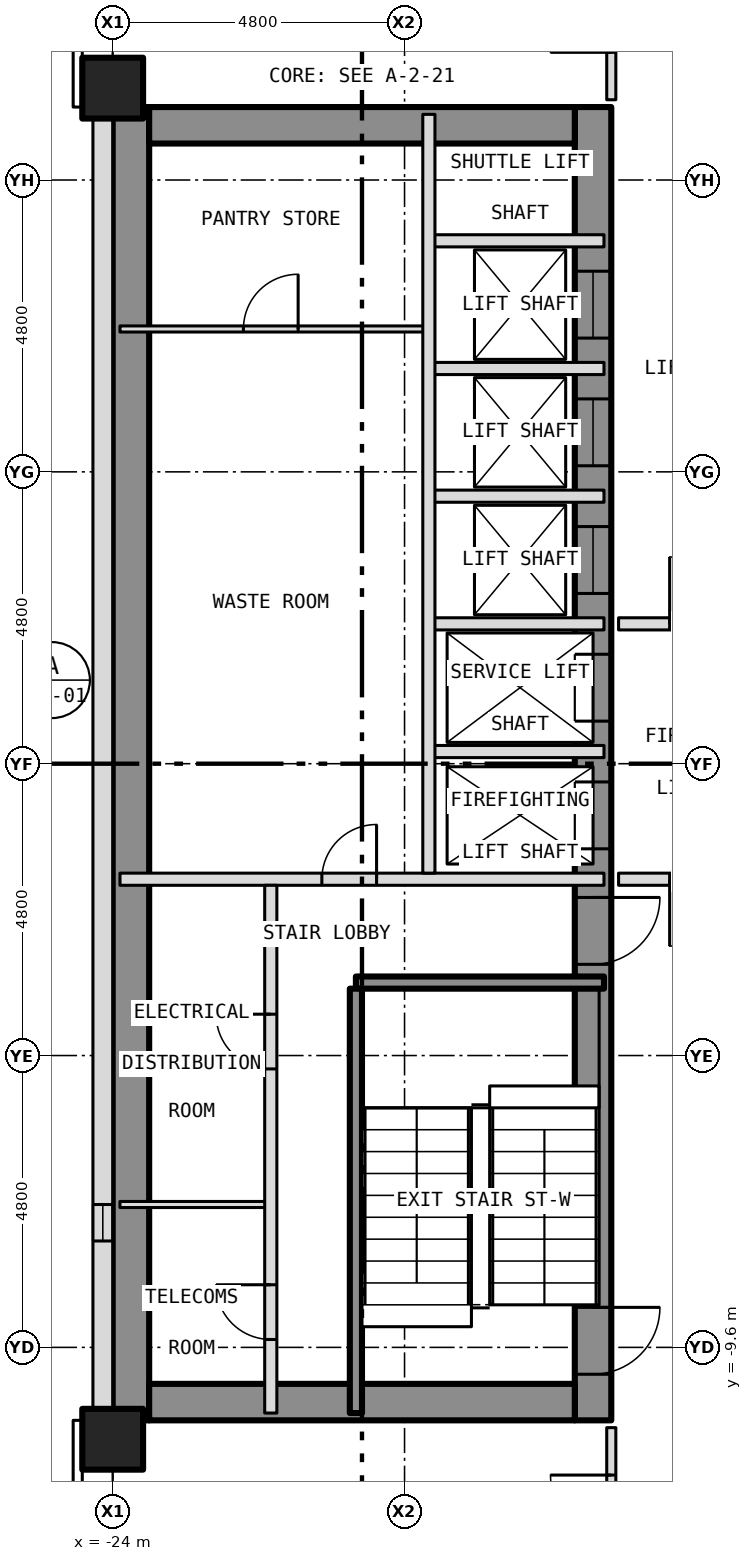
"""IFC4 building model, lengths in metres.
Left out: names, types, materials, properties, quantities, classifications, styles, units other than length and angle.
Written with IfcOpenShell. Run it as: python <this file> out.ifc"""

import sys

from ifc_helpers import new_model, si_unit, direction, frame, frame_2d, origin, origin_2d, place, context, subcontext, project, spatial, rectangle, hollow_rectangle, extrude, element, fill, save


model = new_model("IFC4")
c1 = context("Model", 3, precision=1e-05, world=origin(), true_north=direction((0.0, 1.0)))
c2 = subcontext(c1, "Body", "Model", "MODEL_VIEW")
j1 = project(units=[si_unit("LENGTHUNIT", "METRE"), si_unit("PLANEANGLEUNIT", "RADIAN")], contexts=[c1])
p1 = place(None, origin())
s1 = spatial("IfcSite", under=j1, at=p1, CompositionType="ELEMENT")
p2 = place(p1, origin())
s2 = spatial("IfcBuilding", under=s1, at=p2, CompositionType="ELEMENT")
p3 = place(p2, frame((0.0, 0.0, 77.5)))
s3 = spatial("IfcBuildingStorey", under=s2, at=p3, CompositionType="ELEMENT", Elevation=77.5)
for number, where, z_axis, x_axis in (
    (1, (-24.0, -11.111, -0.15), (0.0, 0.0, 1.0), (1.0, 0.0, 0.0)),
    (2, (-24.0, 11.111, -0.15), (0.0, 0.0, 1.0), (1.0, 0.0, 0.0)),
):
    element("IfcColumn", number, at=place(p3, frame(where, z_axis=z_axis, x_axis=x_axis)), inside=s3, PredefinedType="COLUMN", context=c2, shape_type="SweptSolid", body=[
        extrude(hollow_rectangle(XDim=1.0, YDim=1.0, WallThickness=0.06, at=origin_2d()), origin(), (0.0, 0.0, 1.0), 3.5),
    ])
p4 = place(p3, frame((-16.1, -10.8, 0.0), z_axis=(0.0, 0.0, 1.0), x_axis=(0.0, 1.0, 0.0)))
e3 = element("IfcWall", 3, at=p4, inside=s3, PredefinedType="SHEAR", context=c2, shape_type="SweptSolid", body=[
    extrude(rectangle(XDim=21.6, YDim=0.6, at=frame_2d((10.8, 0.0))), origin(), (0.0, 0.0, 1.0), 3.25),
])
p5 = place(p4, frame((9.4, 0.0, 0.0)))
e4 = element("IfcOpeningElement", 4, at=p5, cuts=e3, PredefinedType="OPENING", context=c2, shape_type="SweptSolid", body=[
    extrude(rectangle(XDim=1.1, YDim=2.1, at=frame_2d((0.55, 1.05))), frame((0.0, 0.312, 0.0), z_axis=(0.0, -1.0, 0.0), x_axis=(1.0, 0.0, 0.0)), (0.0, 0.0, 1.0), 0.624),
])
p6 = place(p4, frame((11.5, 0.0, 0.0)))
e5 = element("IfcOpeningElement", 5, at=p6, cuts=e3, PredefinedType="OPENING", context=c2, shape_type="SweptSolid", body=[
    extrude(rectangle(XDim=1.1, YDim=2.1, at=frame_2d((0.55, 1.05))), frame((0.0, 0.312, 0.0), z_axis=(0.0, -1.0, 0.0), x_axis=(1.0, 0.0, 0.0)), (0.0, 0.0, 1.0), 0.624),
])
p7 = place(p4, frame((13.6, 0.0, 0.0)))
e6 = element("IfcOpeningElement", 6, at=p7, cuts=e3, PredefinedType="OPENING", context=c2, shape_type="SweptSolid", body=[
    extrude(rectangle(XDim=1.1, YDim=2.1, at=frame_2d((0.55, 1.05))), frame((0.0, 0.312, 0.0), z_axis=(0.0, -1.0, 0.0), x_axis=(1.0, 0.0, 0.0)), (0.0, 0.0, 1.0), 0.624),
])
p8 = place(p4, frame((15.7, 0.0, 0.0)))
e7 = element("IfcOpeningElement", 7, at=p8, cuts=e3, PredefinedType="OPENING", context=c2, shape_type="SweptSolid", body=[
    extrude(rectangle(XDim=1.1, YDim=2.1, at=frame_2d((0.55, 1.05))), frame((0.0, 0.312, 0.0), z_axis=(0.0, -1.0, 0.0), x_axis=(1.0, 0.0, 0.0)), (0.0, 0.0, 1.0), 0.624),
])
p9 = place(p4, frame((17.8, 0.0, 0.0)))
e8 = element("IfcOpeningElement", 8, at=p9, cuts=e3, PredefinedType="OPENING", context=c2, shape_type="SweptSolid", body=[
    extrude(rectangle(XDim=1.1, YDim=2.1, at=frame_2d((0.55, 1.05))), frame((0.0, 0.312, 0.0), z_axis=(0.0, -1.0, 0.0), x_axis=(1.0, 0.0, 0.0)), (0.0, 0.0, 1.0), 0.624),
])
p10 = place(p4, frame((0.758, 0.0, 0.0)))
e9 = element("IfcOpeningElement", 9, at=p10, cuts=e3, PredefinedType="OPENING", context=c2, shape_type="SweptSolid", body=[
    extrude(rectangle(XDim=1.1, YDim=2.1, at=frame_2d((0.55, 1.05))), frame((0.0, 0.312, 0.0), z_axis=(0.0, -1.0, 0.0), x_axis=(1.0, 0.0, 0.0)), (0.0, 0.0, 1.0), 0.624),
])
p11 = place(p4, frame((7.5, 0.0, 0.0)))
e10 = element("IfcOpeningElement", 10, at=p11, cuts=e3, PredefinedType="OPENING", context=c2, shape_type="SweptSolid", body=[
    extrude(rectangle(XDim=1.1, YDim=2.1, at=frame_2d((0.55, 1.05))), frame((0.0, 0.312, 0.0), z_axis=(0.0, -1.0, 0.0), x_axis=(1.0, 0.0, 0.0)), (0.0, 0.0, 1.0), 0.624),
])
p12 = place(p3, frame((-23.7, -10.8, 0.0), z_axis=(0.0, 0.0, 1.0), x_axis=(0.0, 1.0, 0.0)))
e11 = element("IfcWall", 11, at=p12, inside=s3, PredefinedType="SHEAR", context=c2, shape_type="SweptSolid", body=[
    extrude(rectangle(XDim=21.6, YDim=0.6, at=frame_2d((10.8, 0.0))), origin(), (0.0, 0.0, 1.0), 3.25),
])
for number, where, z_axis, x_axis in (
    (12, (-23.4, 10.5, 0.0), (0.0, 0.0, 1.0), (1.0, 0.0, 0.0)),
    (13, (-23.4, -10.5, 0.0), (0.0, 0.0, 1.0), (1.0, 0.0, 0.0)),
):
    element("IfcWall", number, at=place(p3, frame(where, z_axis=z_axis, x_axis=x_axis)), inside=s3, PredefinedType="SHEAR", context=c2, shape_type="SweptSolid", body=[
        extrude(rectangle(XDim=7.0, YDim=0.6, at=frame_2d((3.5, 0.0))), origin(), (0.0, 0.0, 1.0), 3.25),
    ])
p13 = place(p3, frame((-24.163, 10.8, 0.0), z_axis=(0.0, 0.0, 1.0), x_axis=(0.0, -1.0, 0.0)))
e14 = element("IfcWall", 14, at=p13, inside=s3, PredefinedType="SOLIDWALL", context=c2, shape_type="SweptSolid", body=[
    extrude(rectangle(XDim=21.6, YDim=0.325, at=frame_2d((10.8, 0.0))), origin(), (0.0, 0.0, 1.0), 3.5),
])
p14 = place(p13, frame((18.05, 0.0, 1.0)))
e15 = element("IfcOpeningElement", 15, at=p14, cuts=e14, PredefinedType="OPENING", context=c2, shape_type="SweptSolid", body=[
    extrude(rectangle(XDim=0.6, YDim=1.5, at=frame_2d((0.3, 0.75))), frame((0.0, 0.175, 0.0), z_axis=(0.0, -1.0, 0.0), x_axis=(1.0, 0.0, 0.0)), (0.0, 0.0, 1.0), 0.349),
])
p15 = place(p3, frame((-23.88, -7.25, 0.0), z_axis=(0.0, 0.0, 1.0), x_axis=(1.0, 0.0, 0.0)))
e16 = element("IfcWall", 16, at=p15, inside=s3, PredefinedType="PARTITIONING", context=c2, shape_type="SweptSolid", body=[
    extrude(rectangle(XDim=2.48, YDim=0.1, at=frame_2d((1.24, 0.0))), origin(), (0.0, 0.0, 1.0), 3.25),
])
p16 = place(p3, frame((-20.0, -3.6, 0.0), z_axis=(0.0, 0.0, 1.0), x_axis=(1.0, 0.0, 0.0)))
e17 = element("IfcWall", 17, at=p16, inside=s3, PredefinedType="SHEAR", context=c2, shape_type="SweptSolid", body=[
    extrude(rectangle(XDim=4.08, YDim=0.2, at=frame_2d((2.04, 0.0))), origin(), (0.0, 0.0, 1.0), 3.25),
])
p17 = place(p3, frame((-23.88, -1.9, 0.0), z_axis=(0.0, 0.0, 1.0), x_axis=(1.0, 0.0, 0.0)))
e18 = element("IfcWall", 18, at=p17, inside=s3, PredefinedType="PARTITIONING", context=c2, shape_type="SweptSolid", body=[
    extrude(rectangle(XDim=7.96, YDim=0.2, at=frame_2d((3.98, 0.0))), origin(), (0.0, 0.0, 1.0), 3.25),
])
p18 = place(p17, frame((3.32, 0.0, 0.0)))
e19 = element("IfcOpeningElement", 19, at=p18, cuts=e18, PredefinedType="OPENING", context=c2, shape_type="SweptSolid", body=[
    extrude(rectangle(XDim=0.9, YDim=2.1, at=frame_2d((0.45, 1.05))), frame((0.0, 0.112, 0.0), z_axis=(0.0, -1.0, 0.0), x_axis=(1.0, 0.0, 0.0)), (0.0, 0.0, 1.0), 0.224),
])
p19 = place(p3, frame((-15.68, -1.9, 0.0), z_axis=(0.0, 0.0, 1.0), x_axis=(1.0, 0.0, 0.0)))
e20 = element("IfcWall", 20, at=p19, inside=s3, PredefinedType="PARTITIONING", context=c2, shape_type="SweptSolid", body=[
    extrude(rectangle(XDim=3.28, YDim=0.2, at=frame_2d((1.64, 0.0))), origin(), (0.0, 0.0, 1.0), 3.35),
])
p20 = place(p19, frame((0.84, 0.0, 0.0)))
e21 = element("IfcOpeningElement", 21, at=p20, cuts=e20, PredefinedType="OPENING", context=c2, shape_type="SweptSolid", body=[
    extrude(rectangle(XDim=1.1, YDim=2.1, at=frame_2d((0.55, 1.05))), frame((0.0, 0.112, 0.0), z_axis=(0.0, -1.0, 0.0), x_axis=(1.0, 0.0, 0.0)), (0.0, 0.0, 1.0), 0.224),
])
for number, where, z_axis, x_axis in (
    (22, (-18.8, 0.2, 0.0), (0.0, 0.0, 1.0), (1.0, 0.0, 0.0)),
    (23, (-18.8, 2.3, 0.0), (0.0, 0.0, 1.0), (1.0, 0.0, 0.0)),
):
    element("IfcWall", number, at=place(p3, frame(where, z_axis=z_axis, x_axis=x_axis)), inside=s3, PredefinedType="PARTITIONING", context=c2, shape_type="SweptSolid", body=[
        extrude(rectangle(XDim=2.88, YDim=0.2, at=frame_2d((1.44, 0.0))), origin(), (0.0, 0.0, 1.0), 3.25),
    ])
p21 = place(p3, frame((-15.68, 2.3, 0.0), z_axis=(0.0, 0.0, 1.0), x_axis=(1.0, 0.0, 0.0)))
e24 = element("IfcWall", 24, at=p21, inside=s3, PredefinedType="PARTITIONING", context=c2, shape_type="SweptSolid", body=[
    extrude(rectangle(XDim=3.28, YDim=0.2, at=frame_2d((1.64, 0.0))), origin(), (0.0, 0.0, 1.0), 3.35),
])
p22 = place(p21, frame((0.84, 0.0, 0.0)))
e25 = element("IfcOpeningElement", 25, at=p22, cuts=e24, PredefinedType="OPENING", context=c2, shape_type="SweptSolid", body=[
    extrude(rectangle(XDim=1.1, YDim=2.1, at=frame_2d((0.55, 1.05))), frame((0.0, 0.112, 0.0), z_axis=(0.0, -1.0, 0.0), x_axis=(1.0, 0.0, 0.0)), (0.0, 0.0, 1.0), 0.224),
])
for number, where, z_axis, x_axis in (
    (26, (-18.8, 4.4, 0.0), (0.0, 0.0, 1.0), (1.0, 0.0, 0.0)),
    (27, (-18.8, 6.5, 0.0), (0.0, 0.0, 1.0), (1.0, 0.0, 0.0)),
):
    element("IfcWall", number, at=place(p3, frame(where, z_axis=z_axis, x_axis=x_axis)), inside=s3, PredefinedType="PARTITIONING", context=c2, shape_type="SweptSolid", body=[
        extrude(rectangle(XDim=2.88, YDim=0.2, at=frame_2d((1.44, 0.0))), origin(), (0.0, 0.0, 1.0), 3.25),
    ])
p23 = place(p3, frame((-23.88, 7.15, 0.0), z_axis=(0.0, 0.0, 1.0), x_axis=(1.0, 0.0, 0.0)))
e28 = element("IfcWall", 28, at=p23, inside=s3, PredefinedType="PARTITIONING", context=c2, shape_type="SweptSolid", body=[
    extrude(rectangle(XDim=5.08, YDim=0.1, at=frame_2d((2.54, 0.0))), origin(), (0.0, 0.0, 1.0), 3.25),
])
p24 = place(p23, frame((2.03, 0.0, 0.0)))
e29 = element("IfcOpeningElement", 29, at=p24, cuts=e28, PredefinedType="OPENING", context=c2, shape_type="SweptSolid", body=[
    extrude(rectangle(XDim=0.9, YDim=2.1, at=frame_2d((0.45, 1.05))), frame((0.0, 0.062, 0.0), z_axis=(0.0, -1.0, 0.0), x_axis=(1.0, 0.0, 0.0)), (0.0, 0.0, 1.0), 0.124),
])
p25 = place(p3, frame((-18.8, 8.6, 0.0), z_axis=(0.0, 0.0, 1.0), x_axis=(1.0, 0.0, 0.0)))
e30 = element("IfcWall", 30, at=p25, inside=s3, PredefinedType="PARTITIONING", context=c2, shape_type="SweptSolid", body=[
    extrude(rectangle(XDim=2.88, YDim=0.2, at=frame_2d((1.44, 0.0))), origin(), (0.0, 0.0, 1.0), 3.25),
])
p26 = place(p3, frame((-21.4, -10.68, 0.0), z_axis=(0.0, 0.0, 1.0), x_axis=(0.0, 1.0, 0.0)))
e31 = element("IfcWall", 31, at=p26, inside=s3, PredefinedType="PARTITIONING", context=c2, shape_type="SweptSolid", body=[
    extrude(rectangle(XDim=8.68, YDim=0.2, at=frame_2d((4.34, 0.0))), origin(), (0.0, 0.0, 1.0), 3.25),
])
p27 = place(p26, frame((1.21, 0.0, 0.0)))
e32 = element("IfcOpeningElement", 32, at=p27, cuts=e31, PredefinedType="OPENING", context=c2, shape_type="SweptSolid", body=[
    extrude(rectangle(XDim=0.9, YDim=2.1, at=frame_2d((0.45, 1.05))), frame((0.0, 0.112, 0.0), z_axis=(0.0, -1.0, 0.0), x_axis=(1.0, 0.0, 0.0)), (0.0, 0.0, 1.0), 0.224),
])
p28 = place(p26, frame((5.66, 0.0, 0.0)))
e33 = element("IfcOpeningElement", 33, at=p28, cuts=e31, PredefinedType="OPENING", context=c2, shape_type="SweptSolid", body=[
    extrude(rectangle(XDim=0.9, YDim=2.1, at=frame_2d((0.45, 1.05))), frame((0.0, 0.112, 0.0), z_axis=(0.0, -1.0, 0.0), x_axis=(1.0, 0.0, 0.0)), (0.0, 0.0, 1.0), 0.224),
])
p29 = place(p3, frame((-20.0, -10.68, 0.0), z_axis=(0.0, 0.0, 1.0), x_axis=(0.0, 1.0, 0.0)))
e34 = element("IfcWall", 34, at=p29, inside=s3, PredefinedType="SHEAR", context=c2, shape_type="SweptSolid", body=[
    extrude(rectangle(XDim=6.98, YDim=0.2, at=frame_2d((3.49, 0.0))), origin(), (0.0, 0.0, 1.0), 3.25),
])
p30 = place(p3, frame((-18.8, -1.8, 0.0), z_axis=(0.0, 0.0, 1.0), x_axis=(0.0, 1.0, 0.0)))
e35 = element("IfcWall", 35, at=p30, inside=s3, PredefinedType="PARTITIONING", context=c2, shape_type="SweptSolid", body=[
    extrude(rectangle(XDim=12.48, YDim=0.2, at=frame_2d((6.24, 0.0))), origin(), (0.0, 0.0, 1.0), 3.25),
])
p31 = place(p3, frame((-15.8, -15.725, 0.0), z_axis=(0.0, 0.0, 1.0), x_axis=(0.0, 1.0, 0.0)))
e36 = element("IfcWall", 36, at=p31, inside=s3, PredefinedType="PARTITIONING", context=c2, shape_type="SweptSolid", body=[
    extrude(rectangle(XDim=4.805, YDim=0.15, at=frame_2d((2.403, 0.0))), origin(), (0.0, 0.0, 1.0), 3.35),
])
p32 = place(p31, frame((3.025, 0.0, 0.0)))
e37 = element("IfcOpeningElement", 37, at=p32, cuts=e36, PredefinedType="OPENING", context=c2, shape_type="SweptSolid", body=[
    extrude(rectangle(XDim=1.0, YDim=2.1, at=frame_2d((0.5, 1.05))), frame((0.0, 0.087, 0.0), z_axis=(0.0, -1.0, 0.0), x_axis=(1.0, 0.0, 0.0)), (0.0, 0.0, 1.0), 0.174),
])
p33 = place(p3, frame((-15.8, 10.92, 0.0), z_axis=(0.0, 0.0, 1.0), x_axis=(0.0, 1.0, 0.0)))
e38 = element("IfcWall", 38, at=p33, inside=s3, PredefinedType="PARTITIONING", context=c2, shape_type="SweptSolid", body=[
    extrude(rectangle(XDim=4.805, YDim=0.15, at=frame_2d((2.403, 0.0))), origin(), (0.0, 0.0, 1.0), 3.35),
])
p34 = place(p33, frame((0.78, 0.0, 0.0)))
e39 = element("IfcOpeningElement", 39, at=p34, cuts=e38, PredefinedType="OPENING", context=c2, shape_type="SweptSolid", body=[
    extrude(rectangle(XDim=1.0, YDim=2.1, at=frame_2d((0.5, 1.05))), frame((0.0, 0.087, 0.0), z_axis=(0.0, -1.0, 0.0), x_axis=(1.0, 0.0, 0.0)), (0.0, 0.0, 1.0), 0.174),
])
p35 = place(p14, origin())
e40 = element("IfcWindow", 40, at=p35, inside=s3, PartitioningType="SINGLE_PANEL", PredefinedType="WINDOW", context=c2, shape_type="SweptSolid", body=[
    extrude(rectangle(XDim=0.6, YDim=1.5, at=frame_2d((0.3, 0.75))), frame((0.0, -0.073, 0.0), z_axis=(0.0, -1.0, 0.0), x_axis=(1.0, 0.0, 0.0)), (0.0, 0.0, 1.0), 0.06),
])
fill(e15, e40)
p36 = place(p5, origin())
e41 = element("IfcDoor", 41, at=p36, inside=s3, OperationType="SLIDING_TO_LEFT", PredefinedType="DOOR", context=c2, shape_type="SweptSolid", body=[
    extrude(rectangle(XDim=1.1, YDim=2.1, at=frame_2d((0.55, 1.05))), frame((0.0, 0.025, 0.0), z_axis=(0.0, -1.0, 0.0), x_axis=(1.0, 0.0, 0.0)), (0.0, 0.0, 1.0), 0.05),
])
fill(e4, e41)
p37 = place(p6, origin())
e42 = element("IfcDoor", 42, at=p37, inside=s3, OperationType="SLIDING_TO_LEFT", PredefinedType="DOOR", context=c2, shape_type="SweptSolid", body=[
    extrude(rectangle(XDim=1.1, YDim=2.1, at=frame_2d((0.55, 1.05))), frame((0.0, 0.025, 0.0), z_axis=(0.0, -1.0, 0.0), x_axis=(1.0, 0.0, 0.0)), (0.0, 0.0, 1.0), 0.05),
])
fill(e5, e42)
p38 = place(p7, origin())
e43 = element("IfcDoor", 43, at=p38, inside=s3, OperationType="SLIDING_TO_LEFT", PredefinedType="DOOR", context=c2, shape_type="SweptSolid", body=[
    extrude(rectangle(XDim=1.1, YDim=2.1, at=frame_2d((0.55, 1.05))), frame((0.0, 0.025, 0.0), z_axis=(0.0, -1.0, 0.0), x_axis=(1.0, 0.0, 0.0)), (0.0, 0.0, 1.0), 0.05),
])
fill(e6, e43)
p39 = place(p8, origin())
e44 = element("IfcDoor", 44, at=p39, inside=s3, OperationType="SLIDING_TO_LEFT", PredefinedType="DOOR", context=c2, shape_type="SweptSolid", body=[
    extrude(rectangle(XDim=1.1, YDim=2.1, at=frame_2d((0.55, 1.05))), frame((0.0, 0.025, 0.0), z_axis=(0.0, -1.0, 0.0), x_axis=(1.0, 0.0, 0.0)), (0.0, 0.0, 1.0), 0.05),
])
fill(e7, e44)
p40 = place(p9, origin())
e45 = element("IfcDoor", 45, at=p40, inside=s3, OperationType="SLIDING_TO_LEFT", PredefinedType="DOOR", context=c2, shape_type="SweptSolid", body=[
    extrude(rectangle(XDim=1.1, YDim=2.1, at=frame_2d((0.55, 1.05))), frame((0.0, 0.025, 0.0), z_axis=(0.0, -1.0, 0.0), x_axis=(1.0, 0.0, 0.0)), (0.0, 0.0, 1.0), 0.05),
])
fill(e8, e45)
p41 = place(p10, origin())
e46 = element("IfcDoor", 46, at=p41, inside=s3, OperationType="SINGLE_SWING_RIGHT", PredefinedType="DOOR", context=c2, shape_type="SweptSolid", body=[
    extrude(rectangle(XDim=1.1, YDim=2.1, at=frame_2d((0.55, 1.05))), frame((0.0, 0.025, 0.0), z_axis=(0.0, -1.0, 0.0), x_axis=(1.0, 0.0, 0.0)), (0.0, 0.0, 1.0), 0.05),
])
fill(e9, e46)
p42 = place(p11, origin())
e47 = element("IfcDoor", 47, at=p42, inside=s3, OperationType="SINGLE_SWING_RIGHT", PredefinedType="DOOR", context=c2, shape_type="SweptSolid", body=[
    extrude(rectangle(XDim=1.1, YDim=2.1, at=frame_2d((0.55, 1.05))), frame((0.0, 0.025, 0.0), z_axis=(0.0, -1.0, 0.0), x_axis=(1.0, 0.0, 0.0)), (0.0, 0.0, 1.0), 0.05),
])
fill(e10, e47)
p43 = place(p27, origin())
e48 = element("IfcDoor", 48, at=p43, inside=s3, OperationType="SINGLE_SWING_RIGHT", PredefinedType="DOOR", context=c2, shape_type="SweptSolid", body=[
    extrude(rectangle(XDim=0.9, YDim=2.1, at=frame_2d((0.45, 1.05))), frame((0.0, 0.025, 0.0), z_axis=(0.0, -1.0, 0.0), x_axis=(1.0, 0.0, 0.0)), (0.0, 0.0, 1.0), 0.05),
])
fill(e32, e48)
p44 = place(p28, origin())
e49 = element("IfcDoor", 49, at=p44, inside=s3, OperationType="SINGLE_SWING_RIGHT", PredefinedType="DOOR", context=c2, shape_type="SweptSolid", body=[
    extrude(rectangle(XDim=0.9, YDim=2.1, at=frame_2d((0.45, 1.05))), frame((0.0, 0.025, 0.0), z_axis=(0.0, -1.0, 0.0), x_axis=(1.0, 0.0, 0.0)), (0.0, 0.0, 1.0), 0.05),
])
fill(e33, e49)
p45 = place(p18, origin())
e50 = element("IfcDoor", 50, at=p45, inside=s3, OperationType="SINGLE_SWING_RIGHT", PredefinedType="DOOR", context=c2, shape_type="SweptSolid", body=[
    extrude(rectangle(XDim=0.9, YDim=2.1, at=frame_2d((0.45, 1.05))), frame((0.0, 0.025, 0.0), z_axis=(0.0, -1.0, 0.0), x_axis=(1.0, 0.0, 0.0)), (0.0, 0.0, 1.0), 0.05),
])
fill(e19, e50)
p46 = place(p24, origin())
e51 = element("IfcDoor", 51, at=p46, inside=s3, OperationType="SINGLE_SWING_RIGHT", PredefinedType="DOOR", context=c2, shape_type="SweptSolid", body=[
    extrude(rectangle(XDim=0.9, YDim=2.1, at=frame_2d((0.45, 1.05))), frame((0.0, 0.025, 0.0), z_axis=(0.0, -1.0, 0.0), x_axis=(1.0, 0.0, 0.0)), (0.0, 0.0, 1.0), 0.05),
])
fill(e29, e51)
p47 = place(p20, origin())
e52 = element("IfcDoor", 52, at=p47, inside=s3, OperationType="SINGLE_SWING_LEFT", PredefinedType="DOOR", context=c2, shape_type="SweptSolid", body=[
    extrude(rectangle(XDim=1.1, YDim=2.1, at=frame_2d((0.55, 1.05))), frame((0.0, 0.025, 0.0), z_axis=(0.0, -1.0, 0.0), x_axis=(1.0, 0.0, 0.0)), (0.0, 0.0, 1.0), 0.05),
])
fill(e21, e52)
p48 = place(p22, origin())
e53 = element("IfcDoor", 53, at=p48, inside=s3, OperationType="SINGLE_SWING_LEFT", PredefinedType="DOOR", context=c2, shape_type="SweptSolid", body=[
    extrude(rectangle(XDim=1.1, YDim=2.1, at=frame_2d((0.55, 1.05))), frame((0.0, 0.025, 0.0), z_axis=(0.0, -1.0, 0.0), x_axis=(1.0, 0.0, 0.0)), (0.0, 0.0, 1.0), 0.05),
])
fill(e25, e53)
p49 = place(p32, origin())
e54 = element("IfcDoor", 54, at=p49, inside=s3, OperationType="SINGLE_SWING_RIGHT", PredefinedType="DOOR", context=c2, shape_type="SweptSolid", body=[
    extrude(rectangle(XDim=1.0, YDim=2.1, at=frame_2d((0.5, 1.05))), frame((0.0, 0.025, 0.0), z_axis=(0.0, -1.0, 0.0), x_axis=(1.0, 0.0, 0.0)), (0.0, 0.0, 1.0), 0.05),
])
fill(e37, e54)
save(model, sys.argv[1])
